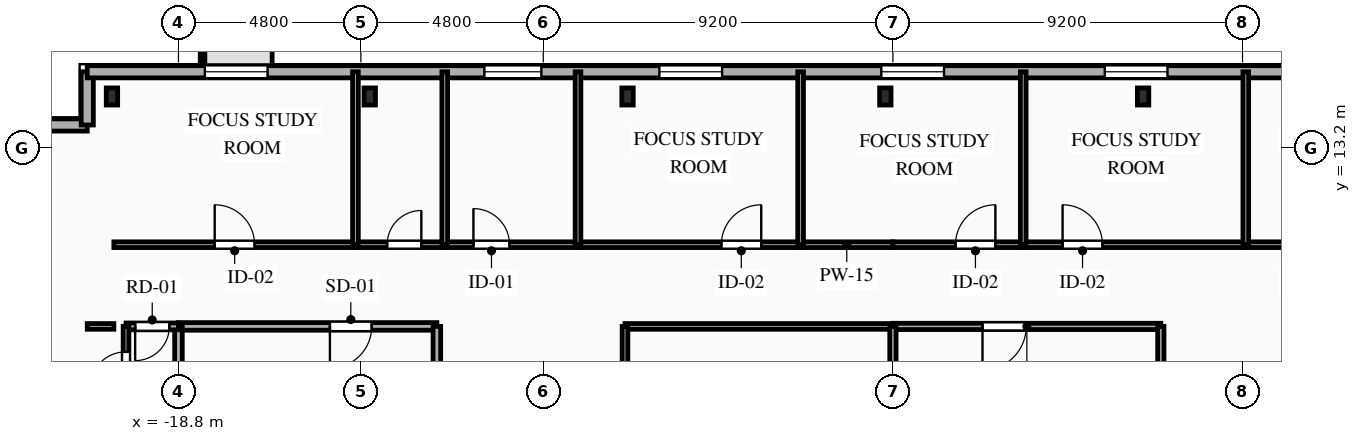
"""IFC4 building model, lengths in metres.
Left out: names, types, materials, properties, quantities, classifications, styles, units other than length and angle.
Written with IfcOpenShell. Run it as: python <this file> out.ifc"""

import sys

from ifc_helpers import new_model, si_unit, direction, frame, frame_2d, origin, origin_2d, place, context, subcontext, project, spatial, rectangle, i_section, extrude, element, fill, save


model = new_model("IFC4")
c1 = context("Model", 3, precision=1e-05, world=origin(), true_north=direction((0.0, 1.0)))
c2 = subcontext(c1, "Body", "Model", "MODEL_VIEW")
j1 = project(units=[si_unit("LENGTHUNIT", "METRE"), si_unit("PLANEANGLEUNIT", "RADIAN")], contexts=[c1])
p1 = place(None, origin())
s1 = spatial("IfcSite", under=j1, at=p1, CompositionType="ELEMENT")
p2 = place(p1, origin())
s2 = spatial("IfcBuilding", under=s1, at=p2, CompositionType="ELEMENT")
p3 = place(p2, frame((0.0, 0.0, 248.4)))
s3 = spatial("IfcBuildingStorey", under=s2, at=p3, CompositionType="ELEMENT", Elevation=248.4)
for number, where, z_axis, x_axis in (
    (1, (6.583, 14.55, 0.0), (0.0, 0.0, 1.0), (1.0, 0.0, 0.0)),
    (2, (-0.2, 14.55, 0.0), (0.0, 0.0, 1.0), (1.0, 0.0, 0.0)),
    (3, (-6.983, 14.55, 0.0), (0.0, 0.0, 1.0), (1.0, 0.0, 0.0)),
    (4, (-13.767, 14.55, 0.0), (0.0, 0.0, 1.0), (1.0, 0.0, 0.0)),
    (5, (-20.55, 14.55, 0.0), (0.0, 0.0, 1.0), (1.0, 0.0, 0.0)),
):
    element("IfcColumn", number, at=place(p3, frame(where, z_axis=z_axis, x_axis=x_axis)), inside=s3, PredefinedType="COLUMN", context=c2, shape_type="SweptSolid", body=[
        extrude(i_section(OverallWidth=0.3, OverallDepth=0.45, WebThickness=0.014, FlangeThickness=0.026, FilletRadius=0.027, at=origin_2d()), origin(), (0.0, 0.0, 1.0), 3.35),
    ])
p4 = place(p3, frame((-22.6, 13.8, 0.0), z_axis=(0.0, 0.0, 1.0), x_axis=(1.0, 0.0, 0.0)))
e6 = element("IfcWall", 6, at=p4, inside=s3, PredefinedType="SOLIDWALL", context=c2, shape_type="SweptSolid", body=[
    extrude(rectangle(XDim=1.4, YDim=0.32, at=frame_2d((0.7, 0.0))), origin(), (0.0, 0.0, 1.0), 3.04),
])
p5 = place(p3, frame((-21.2, 13.8, 0.0), z_axis=(0.0, 0.0, 1.0), x_axis=(0.0, 1.0, 0.0)))
e7 = element("IfcWall", 7, at=p5, inside=s3, PredefinedType="SOLIDWALL", context=c2, shape_type="SweptSolid", body=[
    extrude(rectangle(XDim=1.4, YDim=0.32, at=frame_2d((0.7, 0.0))), origin(), (0.0, 0.0, 1.0), 3.04),
])
p6 = place(p3, frame((-21.2, 15.2, 0.0), z_axis=(0.0, 0.0, 1.0), x_axis=(1.0, 0.0, 0.0)))
e8 = element("IfcWall", 8, at=p6, inside=s3, PredefinedType="SOLIDWALL", context=c2, shape_type="SweptSolid", body=[
    extrude(rectangle(XDim=42.0, YDim=0.32, at=frame_2d((21.0, 0.0))), origin(), (0.0, 0.0, 1.0), 3.04),
])
p7 = place(p6, frame((3.095, 0.0, 0.85)))
e9 = element("IfcOpeningElement", 9, at=p7, cuts=e8, PredefinedType="OPENING", context=c2, shape_type="SweptSolid", body=[
    extrude(rectangle(XDim=1.65, YDim=1.85, at=frame_2d((0.825, 0.925))), frame((0.0, 0.17, 0.0), z_axis=(0.0, -1.0, 0.0), x_axis=(1.0, 0.0, 0.0)), (0.0, 0.0, 1.0), 0.34),
])
p8 = place(p6, frame((10.45, 0.0, 0.85)))
e10 = element("IfcOpeningElement", 10, at=p8, cuts=e8, PredefinedType="OPENING", context=c2, shape_type="SweptSolid", body=[
    extrude(rectangle(XDim=1.5, YDim=1.85, at=frame_2d((0.75, 0.925))), frame((0.0, 0.17, 0.0), z_axis=(0.0, -1.0, 0.0), x_axis=(1.0, 0.0, 0.0)), (0.0, 0.0, 1.0), 0.34),
])
p9 = place(p6, frame((15.055, 0.0, 0.85)))
e11 = element("IfcOpeningElement", 11, at=p9, cuts=e8, PredefinedType="OPENING", context=c2, shape_type="SweptSolid", body=[
    extrude(rectangle(XDim=1.65, YDim=1.85, at=frame_2d((0.825, 0.925))), frame((0.0, 0.17, 0.0), z_axis=(0.0, -1.0, 0.0), x_axis=(1.0, 0.0, 0.0)), (0.0, 0.0, 1.0), 0.34),
])
p10 = place(p6, frame((20.895, 0.0, 0.85)))
e12 = element("IfcOpeningElement", 12, at=p10, cuts=e8, PredefinedType="OPENING", context=c2, shape_type="SweptSolid", body=[
    extrude(rectangle(XDim=1.65, YDim=1.85, at=frame_2d((0.825, 0.925))), frame((0.0, 0.17, 0.0), z_axis=(0.0, -1.0, 0.0), x_axis=(1.0, 0.0, 0.0)), (0.0, 0.0, 1.0), 0.34),
])
p11 = place(p6, frame((26.775, 0.0, 0.85)))
e13 = element("IfcOpeningElement", 13, at=p11, cuts=e8, PredefinedType="OPENING", context=c2, shape_type="SweptSolid", body=[
    extrude(rectangle(XDim=1.65, YDim=1.85, at=frame_2d((0.825, 0.925))), frame((0.0, 0.17, 0.0), z_axis=(0.0, -1.0, 0.0), x_axis=(1.0, 0.0, 0.0)), (0.0, 0.0, 1.0), 0.34),
])
p12 = place(p6, frame((32.655, 0.0, 0.85)))
e14 = element("IfcOpeningElement", 14, at=p12, cuts=e8, PredefinedType="OPENING", context=c2, shape_type="SweptSolid", body=[
    extrude(rectangle(XDim=1.65, YDim=1.85, at=frame_2d((0.825, 0.925))), frame((0.0, 0.17, 0.0), z_axis=(0.0, -1.0, 0.0), x_axis=(1.0, 0.0, 0.0)), (0.0, 0.0, 1.0), 0.34),
])
p13 = place(p6, frame((38.175, 0.0, 0.85)))
e15 = element("IfcOpeningElement", 15, at=p13, cuts=e8, PredefinedType="OPENING", context=c2, shape_type="SweptSolid", body=[
    extrude(rectangle(XDim=1.65, YDim=1.85, at=frame_2d((0.825, 0.925))), frame((0.0, 0.17, 0.0), z_axis=(0.0, -1.0, 0.0), x_axis=(1.0, 0.0, 0.0)), (0.0, 0.0, 1.0), 0.34),
])
p14 = place(p3, frame((-12.0, 8.5, 0.0), z_axis=(0.0, 0.0, 1.0), x_axis=(-1.0, 0.0, 0.0)))
e16 = element("IfcWall", 16, at=p14, inside=s3, PredefinedType="PARTITIONING", context=c2, shape_type="SweptSolid", body=[
    extrude(rectangle(XDim=6.8, YDim=0.2, at=frame_2d((3.4, 0.0))), origin(), (0.0, 0.0, 1.0), 3.04),
])
p15 = place(p14, frame((1.715, 0.0, 0.0)))
e17 = element("IfcOpeningElement", 17, at=p15, cuts=e16, PredefinedType="OPENING", context=c2, shape_type="SweptSolid", body=[
    extrude(rectangle(XDim=1.1, YDim=2.15, at=frame_2d((0.55, 1.075))), frame((0.0, 0.11, 0.0), z_axis=(0.0, -1.0, 0.0), x_axis=(1.0, 0.0, 0.0)), (0.0, 0.0, 1.0), 0.22),
])
p16 = place(p3, frame((-12.0, 5.6, 0.0), z_axis=(0.0, 0.0, 1.0), x_axis=(0.0, 1.0, 0.0)))
e18 = element("IfcWall", 18, at=p16, inside=s3, PredefinedType="PARTITIONING", context=c2, shape_type="SweptSolid", body=[
    extrude(rectangle(XDim=2.9, YDim=0.2, at=frame_2d((1.45, 0.0))), origin(), (0.0, 0.0, 1.0), 3.04),
])
p17 = place(p3, frame((-18.8, 8.5, 0.0), z_axis=(0.0, 0.0, 1.0), x_axis=(0.0, -1.0, 0.0)))
e19 = element("IfcWall", 19, at=p17, inside=s3, PredefinedType="PARTITIONING", context=c2, shape_type="SweptSolid", body=[
    extrude(rectangle(XDim=2.9, YDim=0.2, at=frame_2d((1.45, 0.0))), origin(), (0.0, 0.0, 1.0), 2.665),
])
p18 = place(p3, frame((-18.8, 8.5, 0.0), z_axis=(0.0, 0.0, 1.0), x_axis=(-1.0, 0.0, 0.0)))
e20 = element("IfcWall", 20, at=p18, inside=s3, PredefinedType="PARTITIONING", context=c2, shape_type="SweptSolid", body=[
    extrude(rectangle(XDim=1.38, YDim=0.18, at=frame_2d((0.69, 0.0))), origin(), (0.0, 0.0, 1.0), 3.04),
])
p19 = place(p18, frame((0.24, 0.0, 0.0)))
e21 = element("IfcOpeningElement", 21, at=p19, cuts=e20, PredefinedType="OPENING", context=c2, shape_type="SweptSolid", body=[
    extrude(rectangle(XDim=0.9, YDim=2.1, at=frame_2d((0.45, 1.05))), frame((0.0, 0.1, 0.0), z_axis=(0.0, -1.0, 0.0), x_axis=(1.0, 0.0, 0.0)), (0.0, 0.0, 1.0), 0.2),
])
p20 = place(p3, frame((-20.5, 8.5, 0.0), z_axis=(0.0, 0.0, 1.0), x_axis=(-1.0, 0.0, 0.0)))
e22 = element("IfcWall", 22, at=p20, inside=s3, PredefinedType="PARTITIONING", context=c2, shape_type="SweptSolid", body=[
    extrude(rectangle(XDim=0.7, YDim=0.15, at=frame_2d((0.35, 0.0))), origin(), (0.0, 0.0, 1.0), 3.04),
])
p21 = place(p3, frame((-20.5, 10.65, 0.0), z_axis=(0.0, 0.0, 1.0), x_axis=(1.0, 0.0, 0.0)))
e23 = element("IfcWall", 23, at=p21, inside=s3, PredefinedType="PARTITIONING", context=c2, shape_type="SweptSolid", body=[
    extrude(rectangle(XDim=6.357, YDim=0.15, at=frame_2d((3.178, 0.0))), origin(), (0.0, 0.0, 1.0), 3.04),
])
p22 = place(p21, frame((2.654, 0.0, 0.0)))
e24 = element("IfcOpeningElement", 24, at=p22, cuts=e23, PredefinedType="OPENING", context=c2, shape_type="SweptSolid", body=[
    extrude(rectangle(XDim=1.05, YDim=2.15, at=frame_2d((0.525, 1.075))), frame((0.0, 0.085, 0.0), z_axis=(0.0, -1.0, 0.0), x_axis=(1.0, 0.0, 0.0)), (0.0, 0.0, 1.0), 0.17),
])
p23 = place(p3, frame((-14.143, 10.65, 0.0), z_axis=(0.0, 0.0, 1.0), x_axis=(1.0, 0.0, 0.0)))
e25 = element("IfcWall", 25, at=p23, inside=s3, PredefinedType="PLUMBINGWALL", context=c2, shape_type="SweptSolid", body=[
    extrude(rectangle(XDim=2.35, YDim=0.15, at=frame_2d((1.175, 0.0))), origin(), (0.0, 0.0, 1.0), 3.04),
])
p24 = place(p23, frame((0.834, 0.0, 0.0)))
e26 = element("IfcOpeningElement", 26, at=p24, cuts=e25, PredefinedType="OPENING", context=c2, shape_type="SweptSolid", body=[
    extrude(rectangle(XDim=0.9, YDim=2.1, at=frame_2d((0.45, 1.05))), frame((0.0, 0.085, 0.0), z_axis=(0.0, -1.0, 0.0), x_axis=(1.0, 0.0, 0.0)), (0.0, 0.0, 1.0), 0.17),
])
p25 = place(p3, frame((-11.793, 10.65, 0.0), z_axis=(0.0, 0.0, 1.0), x_axis=(1.0, 0.0, 0.0)))
e27 = element("IfcWall", 27, at=p25, inside=s3, PredefinedType="PARTITIONING", context=c2, shape_type="SweptSolid", body=[
    extrude(rectangle(XDim=3.507, YDim=0.15, at=frame_2d((1.753, 0.0))), origin(), (0.0, 0.0, 1.0), 3.04),
])
p26 = place(p25, frame((0.755, 0.0, 0.0)))
e28 = element("IfcOpeningElement", 28, at=p26, cuts=e27, PredefinedType="OPENING", context=c2, shape_type="SweptSolid", body=[
    extrude(rectangle(XDim=0.95, YDim=2.1, at=frame_2d((0.475, 1.05))), frame((0.0, 0.085, 0.0), z_axis=(0.0, -1.0, 0.0), x_axis=(1.0, 0.0, 0.0)), (0.0, 0.0, 1.0), 0.17),
])
p27 = place(p3, frame((-8.286, 10.65, 0.0), z_axis=(0.0, 0.0, 1.0), x_axis=(1.0, 0.0, 0.0)))
e29 = element("IfcWall", 29, at=p27, inside=s3, PredefinedType="PARTITIONING", context=c2, shape_type="SweptSolid", body=[
    extrude(rectangle(XDim=5.857, YDim=0.15, at=frame_2d((2.928, 0.0))), origin(), (0.0, 0.0, 1.0), 3.04),
])
p28 = place(p27, frame((3.771, 0.0, 0.0)))
e30 = element("IfcOpeningElement", 30, at=p28, cuts=e29, PredefinedType="OPENING", context=c2, shape_type="SweptSolid", body=[
    extrude(rectangle(XDim=1.05, YDim=2.15, at=frame_2d((0.525, 1.075))), frame((0.0, 0.085, 0.0), z_axis=(0.0, -1.0, 0.0), x_axis=(1.0, 0.0, 0.0)), (0.0, 0.0, 1.0), 0.17),
])
p29 = place(p3, frame((-2.429, 10.65, 0.0), z_axis=(0.0, 0.0, 1.0), x_axis=(1.0, 0.0, 0.0)))
e31 = element("IfcWall", 31, at=p29, inside=s3, PredefinedType="PARTITIONING", context=c2, shape_type="SweptSolid", body=[
    extrude(rectangle(XDim=2.429, YDim=0.15, at=frame_2d((1.214, 0.0))), origin(), (0.0, 0.0, 1.0), 3.04),
])
p30 = place(p3, frame((0.0, 8.5, 0.0), z_axis=(0.0, 0.0, 1.0), x_axis=(-1.0, 0.0, 0.0)))
e32 = element("IfcWall", 32, at=p30, inside=s3, PredefinedType="PARTITIONING", context=c2, shape_type="SweptSolid", body=[
    extrude(rectangle(XDim=7.05, YDim=0.15, at=frame_2d((3.525, 0.0))), origin(), (0.0, 0.0, 1.0), 3.04),
])
p31 = place(p3, frame((0.0, 10.65, 0.0), z_axis=(0.0, 0.0, 1.0), x_axis=(1.0, 0.0, 0.0)))
e33 = element("IfcWall", 33, at=p31, inside=s3, PredefinedType="PARTITIONING", context=c2, shape_type="SweptSolid", body=[
    extrude(rectangle(XDim=3.429, YDim=0.15, at=frame_2d((1.714, 0.0))), origin(), (0.0, 0.0, 1.0), 3.04),
])
p32 = place(p31, frame((1.646, 0.0, 0.0)))
e34 = element("IfcOpeningElement", 34, at=p32, cuts=e33, PredefinedType="OPENING", context=c2, shape_type="SweptSolid", body=[
    extrude(rectangle(XDim=1.05, YDim=2.15, at=frame_2d((0.525, 1.075))), frame((0.0, 0.085, 0.0), z_axis=(0.0, -1.0, 0.0), x_axis=(1.0, 0.0, 0.0)), (0.0, 0.0, 1.0), 0.17),
])
p33 = place(p3, frame((3.429, 10.65, 0.0), z_axis=(0.0, 0.0, 1.0), x_axis=(1.0, 0.0, 0.0)))
e35 = element("IfcWall", 35, at=p33, inside=s3, PredefinedType="PARTITIONING", context=c2, shape_type="SweptSolid", body=[
    extrude(rectangle(XDim=5.857, YDim=0.15, at=frame_2d((2.928, 0.0))), origin(), (0.0, 0.0, 1.0), 3.04),
])
p34 = place(p33, frame((1.036, 0.0, 0.0)))
e36 = element("IfcOpeningElement", 36, at=p34, cuts=e35, PredefinedType="OPENING", context=c2, shape_type="SweptSolid", body=[
    extrude(rectangle(XDim=1.05, YDim=2.15, at=frame_2d((0.525, 1.075))), frame((0.0, 0.085, 0.0), z_axis=(0.0, -1.0, 0.0), x_axis=(1.0, 0.0, 0.0)), (0.0, 0.0, 1.0), 0.17),
])
p35 = place(p3, frame((9.286, 10.65, 0.0), z_axis=(0.0, 0.0, 1.0), x_axis=(1.0, 0.0, 0.0)))
e37 = element("IfcWall", 37, at=p35, inside=s3, PredefinedType="PARTITIONING", context=c2, shape_type="SweptSolid", body=[
    extrude(rectangle(XDim=5.857, YDim=0.15, at=frame_2d((2.929, 0.0))), origin(), (0.0, 0.0, 1.0), 3.04),
])
p36 = place(p35, frame((1.036, 0.0, 0.0)))
e38 = element("IfcOpeningElement", 38, at=p36, cuts=e37, PredefinedType="OPENING", context=c2, shape_type="SweptSolid", body=[
    extrude(rectangle(XDim=1.05, YDim=2.15, at=frame_2d((0.525, 1.075))), frame((0.0, 0.085, 0.0), z_axis=(0.0, -1.0, 0.0), x_axis=(1.0, 0.0, 0.0)), (0.0, 0.0, 1.0), 0.17),
])
p37 = place(p3, frame((7.05, 8.5, 0.0), z_axis=(0.0, 0.0, 1.0), x_axis=(-1.0, 0.0, 0.0)))
e39 = element("IfcWall", 39, at=p37, inside=s3, PredefinedType="PARTITIONING", context=c2, shape_type="SweptSolid", body=[
    extrude(rectangle(XDim=7.05, YDim=0.165, at=frame_2d((3.525, 0.0))), origin(), (0.0, 0.0, 1.0), 3.04),
])
p38 = place(p37, frame((3.542, 0.0, 0.0)))
e40 = element("IfcOpeningElement", 40, at=p38, cuts=e39, PredefinedType="OPENING", context=c2, shape_type="SweptSolid", body=[
    extrude(rectangle(XDim=1.15, YDim=2.15, at=frame_2d((0.575, 1.075))), frame((0.0, 0.093, 0.0), z_axis=(0.0, -1.0, 0.0), x_axis=(1.0, 0.0, 0.0)), (0.0, 0.0, 1.0), 0.185),
])
p39 = place(p3, frame((-7.05, 8.5, 0.0), z_axis=(0.0, 0.0, 1.0), x_axis=(0.0, -1.0, 0.0)))
e41 = element("IfcWall", 41, at=p39, inside=s3, PredefinedType="PARTITIONING", context=c2, shape_type="SweptSolid", body=[
    extrude(rectangle(XDim=14.1, YDim=0.15, at=frame_2d((7.05, 0.0))), origin(), (0.0, 0.0, 1.0), 3.04),
])
p40 = place(p39, frame((8.011, 0.0, 0.0)))
e42 = element("IfcOpeningElement", 42, at=p40, cuts=e41, PredefinedType="OPENING", context=c2, shape_type="SweptSolid", body=[
    extrude(rectangle(XDim=1.05, YDim=2.15, at=frame_2d((0.525, 1.075))), frame((0.0, 0.085, 0.0), z_axis=(0.0, -1.0, 0.0), x_axis=(1.0, 0.0, 0.0)), (0.0, 0.0, 1.0), 0.17),
])
p41 = place(p3, frame((7.05, 1.45, 0.0), z_axis=(0.0, 0.0, 1.0), x_axis=(0.0, 1.0, 0.0)))
e43 = element("IfcWall", 43, at=p41, inside=s3, PredefinedType="PARTITIONING", context=c2, shape_type="SweptSolid", body=[
    extrude(rectangle(XDim=7.05, YDim=0.165, at=frame_2d((3.525, 0.0))), origin(), (0.0, 0.0, 1.0), 3.04),
])
p42 = place(p3, frame((-20.18, 5.68, 0.0), z_axis=(0.0, 0.0, 1.0), x_axis=(0.0, 1.0, 0.0)))
e44 = element("IfcWall", 44, at=p42, inside=s3, PredefinedType="PARTITIONING", context=c2, shape_type="SweptSolid", body=[
    extrude(rectangle(XDim=2.82, YDim=0.15, at=frame_2d((1.41, 0.0))), origin(), (0.0, 0.0, 1.0), 3.04),
])
p43 = place(p42, frame((1.201, 0.0, 0.0)))
e45 = element("IfcOpeningElement", 45, at=p43, cuts=e44, PredefinedType="OPENING", context=c2, shape_type="SweptSolid", body=[
    extrude(rectangle(XDim=0.95, YDim=2.1, at=frame_2d((0.475, 1.05))), frame((0.0, 0.085, 0.0), z_axis=(0.0, -1.0, 0.0), x_axis=(1.0, 0.0, 0.0)), (0.0, 0.0, 1.0), 0.17),
])
for number, where, z_axis, x_axis in (
    (46, (-14.143, 15.2, 0.0), (0.0, 0.0, 1.0), (0.0, -1.0, 0.0)),
    (47, (-11.793, 15.2, 0.0), (0.0, 0.0, 1.0), (0.0, -1.0, 0.0)),
):
    element("IfcWall", number, at=place(p3, frame(where, z_axis=z_axis, x_axis=x_axis)), inside=s3, PredefinedType="PLUMBINGWALL", context=c2, shape_type="SweptSolid", body=[
        extrude(rectangle(XDim=4.55, YDim=0.15, at=frame_2d((2.275, 0.0))), origin(), (0.0, 0.0, 1.0), 3.04),
    ])
for number, where, z_axis, x_axis in (
    (48, (-8.286, 15.2, 0.0), (0.0, 0.0, 1.0), (0.0, -1.0, 0.0)),
    (49, (-2.429, 15.2, 0.0), (0.0, 0.0, 1.0), (0.0, -1.0, 0.0)),
    (50, (3.429, 15.2, 0.0), (0.0, 0.0, 1.0), (0.0, -1.0, 0.0)),
    (51, (9.286, 15.2, 0.0), (0.0, 0.0, 1.0), (0.0, -1.0, 0.0)),
):
    element("IfcWall", number, at=place(p3, frame(where, z_axis=z_axis, x_axis=x_axis)), inside=s3, PredefinedType="PARTITIONING", context=c2, shape_type="SweptSolid", body=[
        extrude(rectangle(XDim=4.55, YDim=0.15, at=frame_2d((2.275, 0.0))), origin(), (0.0, 0.0, 1.0), 3.04),
    ])
p44 = place(p3, frame((0.0, 8.5, 0.0), z_axis=(0.0, 0.0, 1.0), x_axis=(0.0, -1.0, 0.0)))
e52 = element("IfcWall", 52, at=p44, inside=s3, PredefinedType="PARTITIONING", context=c2, shape_type="SweptSolid", body=[
    extrude(rectangle(XDim=7.05, YDim=0.165, at=frame_2d((3.525, 0.0))), origin(), (0.0, 0.0, 1.0), 3.04),
])
p45 = place(p7, origin())
e53 = element("IfcWindow", 53, at=p45, inside=s3, PartitioningType="SINGLE_PANEL", PredefinedType="WINDOW", context=c2, shape_type="SweptSolid", body=[
    extrude(rectangle(XDim=1.65, YDim=1.85, at=frame_2d((0.825, 0.925))), frame((0.0, 0.03, 0.0), z_axis=(0.0, -1.0, 0.0), x_axis=(1.0, 0.0, 0.0)), (0.0, 0.0, 1.0), 0.06),
])
fill(e9, e53)
p46 = place(p8, origin())
e54 = element("IfcWindow", 54, at=p46, inside=s3, PartitioningType="SINGLE_PANEL", PredefinedType="WINDOW", context=c2, shape_type="SweptSolid", body=[
    extrude(rectangle(XDim=1.5, YDim=1.85, at=frame_2d((0.75, 0.925))), frame((0.0, 0.03, 0.0), z_axis=(0.0, -1.0, 0.0), x_axis=(1.0, 0.0, 0.0)), (0.0, 0.0, 1.0), 0.06),
])
fill(e10, e54)
p47 = place(p9, origin())
e55 = element("IfcWindow", 55, at=p47, inside=s3, PartitioningType="SINGLE_PANEL", PredefinedType="WINDOW", context=c2, shape_type="SweptSolid", body=[
    extrude(rectangle(XDim=1.65, YDim=1.85, at=frame_2d((0.825, 0.925))), frame((0.0, 0.03, 0.0), z_axis=(0.0, -1.0, 0.0), x_axis=(1.0, 0.0, 0.0)), (0.0, 0.0, 1.0), 0.06),
])
fill(e11, e55)
p48 = place(p10, origin())
e56 = element("IfcWindow", 56, at=p48, inside=s3, PartitioningType="SINGLE_PANEL", PredefinedType="WINDOW", context=c2, shape_type="SweptSolid", body=[
    extrude(rectangle(XDim=1.65, YDim=1.85, at=frame_2d((0.825, 0.925))), frame((0.0, 0.03, 0.0), z_axis=(0.0, -1.0, 0.0), x_axis=(1.0, 0.0, 0.0)), (0.0, 0.0, 1.0), 0.06),
])
fill(e12, e56)
p49 = place(p11, origin())
e57 = element("IfcWindow", 57, at=p49, inside=s3, PartitioningType="SINGLE_PANEL", PredefinedType="WINDOW", context=c2, shape_type="SweptSolid", body=[
    extrude(rectangle(XDim=1.65, YDim=1.85, at=frame_2d((0.825, 0.925))), frame((0.0, 0.03, 0.0), z_axis=(0.0, -1.0, 0.0), x_axis=(1.0, 0.0, 0.0)), (0.0, 0.0, 1.0), 0.06),
])
fill(e13, e57)
p50 = place(p15, origin())
e58 = element("IfcDoor", 58, at=p50, inside=s3, OperationType="SINGLE_SWING_RIGHT", PredefinedType="DOOR", context=c2, shape_type="SweptSolid", body=[
    extrude(rectangle(XDim=1.1, YDim=2.15, at=frame_2d((0.55, 1.075))), frame((0.0, 0.025, 0.0), z_axis=(0.0, -1.0, 0.0), x_axis=(1.0, 0.0, 0.0)), (0.0, 0.0, 1.0), 0.05),
])
fill(e17, e58)
p51 = place(p19, origin())
e59 = element("IfcDoor", 59, at=p51, inside=s3, OperationType="SINGLE_SWING_RIGHT", PredefinedType="DOOR", context=c2, shape_type="SweptSolid", body=[
    extrude(rectangle(XDim=0.9, YDim=2.1, at=frame_2d((0.45, 1.05))), frame((0.0, 0.025, 0.0), z_axis=(0.0, -1.0, 0.0), x_axis=(1.0, 0.0, 0.0)), (0.0, 0.0, 1.0), 0.05),
])
fill(e21, e59)
p52 = place(p22, origin())
e60 = element("IfcDoor", 60, at=p52, inside=s3, OperationType="SINGLE_SWING_LEFT", PredefinedType="DOOR", context=c2, shape_type="SweptSolid", body=[
    extrude(rectangle(XDim=1.05, YDim=2.15, at=frame_2d((0.525, 1.075))), frame((0.0, 0.025, 0.0), z_axis=(0.0, -1.0, 0.0), x_axis=(1.0, 0.0, 0.0)), (0.0, 0.0, 1.0), 0.05),
])
fill(e24, e60)
p53 = place(p24, origin())
e61 = element("IfcDoor", 61, at=p53, inside=s3, OperationType="SINGLE_SWING_RIGHT", PredefinedType="DOOR", context=c2, shape_type="SweptSolid", body=[
    extrude(rectangle(XDim=0.9, YDim=2.1, at=frame_2d((0.45, 1.05))), frame((0.0, 0.025, 0.0), z_axis=(0.0, -1.0, 0.0), x_axis=(1.0, 0.0, 0.0)), (0.0, 0.0, 1.0), 0.05),
])
fill(e26, e61)
p54 = place(p26, origin())
e62 = element("IfcDoor", 62, at=p54, inside=s3, OperationType="SINGLE_SWING_LEFT", PredefinedType="DOOR", context=c2, shape_type="SweptSolid", body=[
    extrude(rectangle(XDim=0.95, YDim=2.1, at=frame_2d((0.475, 1.05))), frame((0.0, 0.025, 0.0), z_axis=(0.0, -1.0, 0.0), x_axis=(1.0, 0.0, 0.0)), (0.0, 0.0, 1.0), 0.05),
])
fill(e28, e62)
p55 = place(p28, origin())
e63 = element("IfcDoor", 63, at=p55, inside=s3, OperationType="SINGLE_SWING_RIGHT", PredefinedType="DOOR", context=c2, shape_type="SweptSolid", body=[
    extrude(rectangle(XDim=1.05, YDim=2.15, at=frame_2d((0.525, 1.075))), frame((0.0, 0.025, 0.0), z_axis=(0.0, -1.0, 0.0), x_axis=(1.0, 0.0, 0.0)), (0.0, 0.0, 1.0), 0.05),
])
fill(e30, e63)
p56 = place(p32, origin())
e64 = element("IfcDoor", 64, at=p56, inside=s3, OperationType="SINGLE_SWING_RIGHT", PredefinedType="DOOR", context=c2, shape_type="SweptSolid", body=[
    extrude(rectangle(XDim=1.05, YDim=2.15, at=frame_2d((0.525, 1.075))), frame((0.0, 0.025, 0.0), z_axis=(0.0, -1.0, 0.0), x_axis=(1.0, 0.0, 0.0)), (0.0, 0.0, 1.0), 0.05),
])
fill(e34, e64)
p57 = place(p34, origin())
e65 = element("IfcDoor", 65, at=p57, inside=s3, OperationType="SINGLE_SWING_LEFT", PredefinedType="DOOR", context=c2, shape_type="SweptSolid", body=[
    extrude(rectangle(XDim=1.05, YDim=2.15, at=frame_2d((0.525, 1.075))), frame((0.0, 0.025, 0.0), z_axis=(0.0, -1.0, 0.0), x_axis=(1.0, 0.0, 0.0)), (0.0, 0.0, 1.0), 0.05),
])
fill(e36, e65)
p58 = place(p38, origin())
e66 = element("IfcDoor", 66, at=p58, inside=s3, OperationType="SINGLE_SWING_RIGHT", PredefinedType="DOOR", context=c2, shape_type="SweptSolid", body=[
    extrude(rectangle(XDim=1.15, YDim=2.15, at=frame_2d((0.575, 1.075))), frame((0.0, 0.025, 0.0), z_axis=(0.0, -1.0, 0.0), x_axis=(1.0, 0.0, 0.0)), (0.0, 0.0, 1.0), 0.05),
])
fill(e40, e66)
p59 = place(p43, origin())
e67 = element("IfcDoor", 67, at=p59, inside=s3, OperationType="SINGLE_SWING_LEFT", PredefinedType="DOOR", context=c2, shape_type="SweptSolid", body=[
    extrude(rectangle(XDim=0.95, YDim=2.1, at=frame_2d((0.475, 1.05))), frame((0.0, 0.025, 0.0), z_axis=(0.0, -1.0, 0.0), x_axis=(1.0, 0.0, 0.0)), (0.0, 0.0, 1.0), 0.05),
])
fill(e45, e67)
save(model, sys.argv[1])
